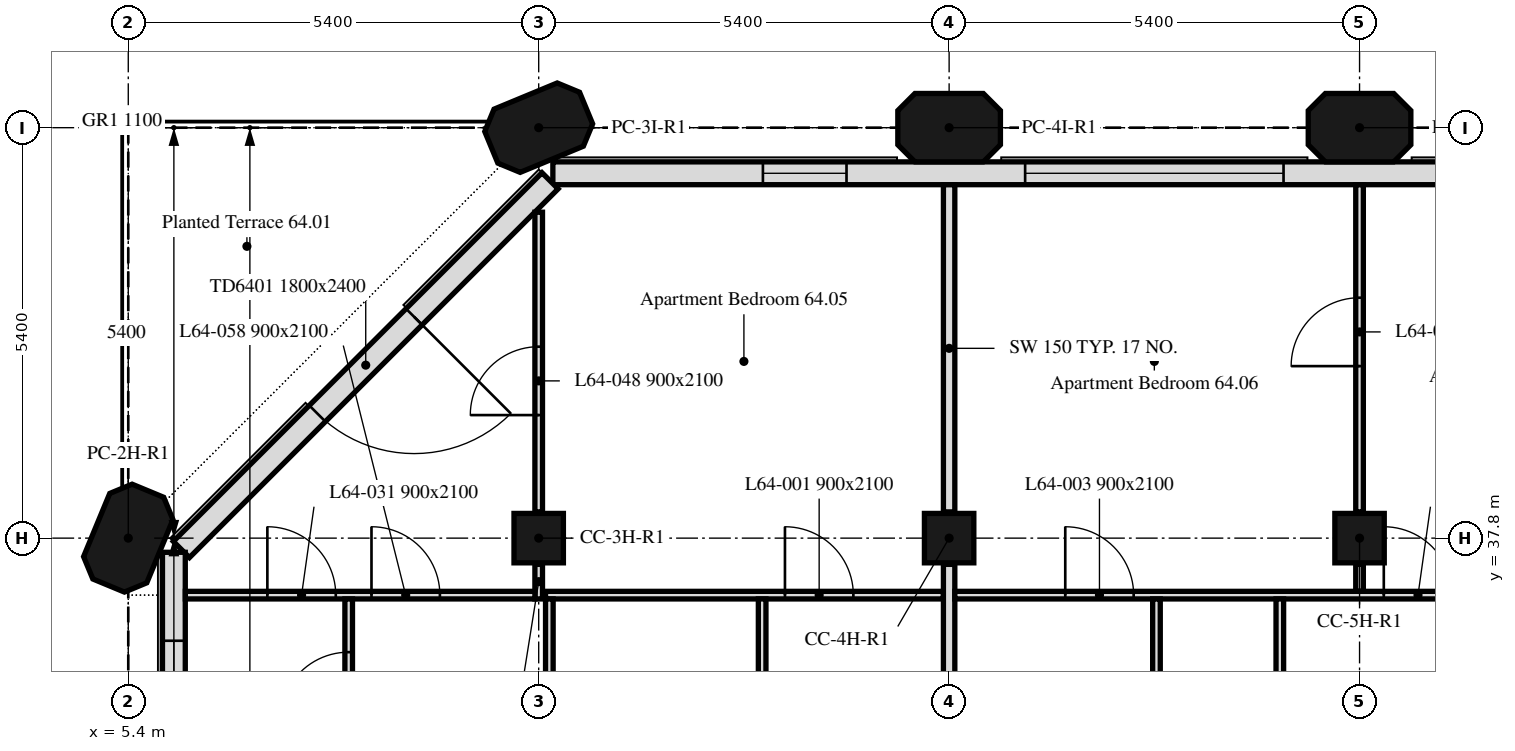
"""IFC4 building model, lengths in metres.
Left out: names, types, materials, properties, quantities, classifications, styles, units other than length and angle.
Written with IfcOpenShell. Run it as: python <this file> out.ifc"""

import sys

from ifc_helpers import new_model, si_unit, direction, frame, frame_2d, origin, origin_2d, place, context, subcontext, project, spatial, polyline, rectangle, outline, extrude, element, fill, save


model = new_model("IFC4")
c1 = context("Model", 3, precision=1e-05, world=origin(), true_north=direction((0.0, 1.0)))
c2 = subcontext(c1, "Body", "Model", "MODEL_VIEW")
j1 = project(units=[si_unit("LENGTHUNIT", "METRE"), si_unit("PLANEANGLEUNIT", "RADIAN")], contexts=[c1])
p1 = place(None, origin())
s1 = spatial("IfcSite", under=j1, at=p1, CompositionType="ELEMENT")
p2 = place(p1, origin())
s2 = spatial("IfcBuilding", under=s1, at=p2, CompositionType="ELEMENT")
p3 = place(p2, frame((0.0, 0.0, 265.3)))
s3 = spatial("IfcBuildingStorey", under=s2, at=p3, CompositionType="ELEMENT", Elevation=265.3)
p4 = place(p3, frame((5.4, 37.8, 0.0), z_axis=(0.0, 0.0, 1.0), x_axis=(0.382683432365, 0.923879532511, 0.0)))
e1 = element("IfcColumn", 1, at=p4, inside=s3, PredefinedType="COLUMN", context=c2, shape_type="SweptSolid", body=[
    extrude(outline(polyline([(-0.45, -0.45), (0.45, -0.45), (0.675, -0.225), (0.675, 0.225), (0.45, 0.45), (-0.45, 0.45), (-0.675, 0.225), (-0.675, -0.225), (-0.45, -0.45)])), origin(), (0.0, 0.0, 1.0), 3.0),
])
for number, where, z_axis, x_axis in (
    (2, (10.8, 37.8, 0.0), (0.0, 0.0, 1.0), (1.0, 0.0, 0.0)),
    (3, (16.2, 37.8, 0.0), (0.0, 0.0, 1.0), (1.0, 0.0, 0.0)),
    (4, (21.6, 37.8, 0.0), (0.0, 0.0, 1.0), (1.0, 0.0, 0.0)),
):
    element("IfcColumn", number, at=place(p3, frame(where, z_axis=z_axis, x_axis=x_axis)), inside=s3, PredefinedType="COLUMN", context=c2, shape_type="SweptSolid", body=[
        extrude(rectangle(XDim=0.65, YDim=0.65, at=origin_2d()), origin(), (0.0, 0.0, 1.0), 3.0),
    ])
for number, where, z_axis, x_axis in (
    (5, (10.8, 43.2, 0.0), (0.0, 0.0, 1.0), (0.924, 0.383, 0.0)),
    (6, (16.2, 43.2, 0.0), (0.0, 0.0, 1.0), (1.0, 0.0, 0.0)),
    (7, (21.6, 43.2, 0.0), (0.0, 0.0, 1.0), (1.0, 0.0, 0.0)),
):
    element("IfcColumn", number, at=place(p3, frame(where, z_axis=z_axis, x_axis=x_axis)), inside=s3, PredefinedType="COLUMN", context=c2, shape_type="SweptSolid", body=[
        extrude(outline(polyline([(-0.45, -0.45), (0.45, -0.45), (0.675, -0.225), (0.675, 0.225), (0.45, 0.45), (-0.45, 0.45), (-0.675, 0.225), (-0.675, -0.225), (-0.45, -0.45)])), origin(), (0.0, 0.0, 1.0), 3.0),
    ])
p5 = place(p3, frame((43.014, 42.6, 0.0), z_axis=(0.0, 0.0, 1.0), x_axis=(-1.0, 0.0, 0.0)))
e8 = element("IfcWall", 8, at=p5, inside=s3, PredefinedType="SOLIDWALL", context=c2, shape_type="SweptSolid", body=[
    extrude(rectangle(XDim=32.027, YDim=0.3, at=frame_2d((16.014, 0.0))), origin(), (0.0, 0.0, 1.0), 3.0),
])
p6 = place(p5, frame((0.814, 0.0, 0.9)))
e9 = element("IfcOpeningElement", 9, at=p6, cuts=e8, PredefinedType="OPENING", context=c2, shape_type="SweptSolid", body=[
    extrude(rectangle(XDim=3.4, YDim=1.7, at=frame_2d((1.7, 0.85))), frame((0.0, 0.16, 0.0), z_axis=(0.0, -1.0, 0.0), x_axis=(1.0, 0.0, 0.0)), (0.0, 0.0, 1.0), 0.32),
])
p7 = place(p5, frame((6.564, 0.0, 0.9)))
e10 = element("IfcOpeningElement", 10, at=p7, cuts=e8, PredefinedType="OPENING", context=c2, shape_type="SweptSolid", body=[
    extrude(rectangle(XDim=1.1, YDim=1.7, at=frame_2d((0.55, 0.85))), frame((0.0, 0.16, 0.0), z_axis=(0.0, -1.0, 0.0), x_axis=(1.0, 0.0, 0.0)), (0.0, 0.0, 1.0), 0.32),
])
p8 = place(p5, frame((11.614, 0.0, 0.9)))
e11 = element("IfcOpeningElement", 11, at=p8, cuts=e8, PredefinedType="OPENING", context=c2, shape_type="SweptSolid", body=[
    extrude(rectangle(XDim=3.4, YDim=1.7, at=frame_2d((1.7, 0.85))), frame((0.0, 0.16, 0.0), z_axis=(0.0, -1.0, 0.0), x_axis=(1.0, 0.0, 0.0)), (0.0, 0.0, 1.0), 0.32),
])
p9 = place(p5, frame((17.364, 0.0, 0.9)))
e12 = element("IfcOpeningElement", 12, at=p9, cuts=e8, PredefinedType="OPENING", context=c2, shape_type="SweptSolid", body=[
    extrude(rectangle(XDim=1.1, YDim=1.7, at=frame_2d((0.55, 0.85))), frame((0.0, 0.16, 0.0), z_axis=(0.0, -1.0, 0.0), x_axis=(1.0, 0.0, 0.0)), (0.0, 0.0, 1.0), 0.32),
])
p10 = place(p5, frame((22.414, 0.0, 0.9)))
e13 = element("IfcOpeningElement", 13, at=p10, cuts=e8, PredefinedType="OPENING", context=c2, shape_type="SweptSolid", body=[
    extrude(rectangle(XDim=3.4, YDim=1.7, at=frame_2d((1.7, 0.85))), frame((0.0, 0.16, 0.0), z_axis=(0.0, -1.0, 0.0), x_axis=(1.0, 0.0, 0.0)), (0.0, 0.0, 1.0), 0.32),
])
p11 = place(p5, frame((28.164, 0.0, 0.9)))
e14 = element("IfcOpeningElement", 14, at=p11, cuts=e8, PredefinedType="OPENING", context=c2, shape_type="SweptSolid", body=[
    extrude(rectangle(XDim=1.1, YDim=1.7, at=frame_2d((0.55, 0.85))), frame((0.0, 0.16, 0.0), z_axis=(0.0, -1.0, 0.0), x_axis=(1.0, 0.0, 0.0)), (0.0, 0.0, 1.0), 0.32),
])
p12 = place(p3, frame((10.949, 42.501, 0.0), z_axis=(0.0, 0.0, 1.0), x_axis=(-0.707106781187, -0.707106781187, 0.0)))
e15 = element("IfcWall", 15, at=p12, inside=s3, PredefinedType="SOLIDWALL", context=c2, shape_type="SweptSolid", body=[
    extrude(rectangle(XDim=6.86, YDim=0.3, at=frame_2d((3.43, 0.0))), origin(), (0.0, 0.0, 1.0), 3.0),
])
p13 = place(p12, frame((2.53, 0.0, 0.0)))
e16 = element("IfcOpeningElement", 16, at=p13, cuts=e15, PredefinedType="OPENING", context=c2, shape_type="SweptSolid", body=[
    extrude(rectangle(XDim=1.8, YDim=2.4, at=frame_2d((0.9, 1.2))), frame((0.0, 0.16, 0.0), z_axis=(0.0, -1.0, 0.0), x_axis=(1.0, 0.0, 0.0)), (0.0, 0.0, 1.0), 0.32),
])
p14 = place(p3, frame((6.0, 37.614, 0.0), z_axis=(0.0, 0.0, 1.0), x_axis=(0.0, -1.0, 0.0)))
e17 = element("IfcWall", 17, at=p14, inside=s3, PredefinedType="SOLIDWALL", context=c2, shape_type="SweptSolid", body=[
    extrude(rectangle(XDim=5.214, YDim=0.3, at=frame_2d((2.607, 0.0))), origin(), (0.0, 0.0, 1.0), 3.0),
])
p15 = place(p14, frame((1.164, 0.0, 0.9)))
e18 = element("IfcOpeningElement", 18, at=p15, cuts=e17, PredefinedType="OPENING", context=c2, shape_type="SweptSolid", body=[
    extrude(rectangle(XDim=1.1, YDim=1.7, at=frame_2d((0.55, 0.85))), frame((0.0, 0.16, 0.0), z_axis=(0.0, -1.0, 0.0), x_axis=(1.0, 0.0, 0.0)), (0.0, 0.0, 1.0), 0.32),
])
p16 = place(p14, frame((3.139, 0.0, 0.9)))
e19 = element("IfcOpeningElement", 19, at=p16, cuts=e17, PredefinedType="OPENING", context=c2, shape_type="SweptSolid", body=[
    extrude(rectangle(XDim=0.65, YDim=1.7, at=frame_2d((0.325, 0.85))), frame((0.0, 0.16, 0.0), z_axis=(0.0, -1.0, 0.0), x_axis=(1.0, 0.0, 0.0)), (0.0, 0.0, 1.0), 0.32),
])
p17 = place(p3, frame((10.8, 37.0, 0.0), z_axis=(0.0, 0.0, 1.0), x_axis=(0.0, 1.0, 0.0)))
e20 = element("IfcWall", 20, at=p17, inside=s3, PredefinedType="PARTITIONING", context=c2, shape_type="SweptSolid", body=[
    extrude(rectangle(XDim=0.455, YDim=0.1, at=frame_2d((0.228, 0.0))), origin(), (0.0, 0.0, 1.0), 3.0),
])
p18 = place(p3, frame((10.8, 38.145, 0.0), z_axis=(0.0, 0.0, 1.0), x_axis=(0.0, 1.0, 0.0)))
e21 = element("IfcWall", 21, at=p18, inside=s3, PredefinedType="PARTITIONING", context=c2, shape_type="SweptSolid", body=[
    extrude(rectangle(XDim=3.943, YDim=0.1, at=frame_2d((1.971, 0.0))), origin(), (0.0, 0.0, 1.0), 3.0),
])
p19 = place(p18, frame((1.274, 0.0, 0.0)))
e22 = element("IfcOpeningElement", 22, at=p19, cuts=e21, PredefinedType="OPENING", context=c2, shape_type="SweptSolid", body=[
    extrude(rectangle(XDim=0.9, YDim=2.1, at=frame_2d((0.45, 1.05))), frame((0.0, 0.05, 0.0), z_axis=(0.0, -1.0, 0.0), x_axis=(1.0, 0.0, 0.0)), (0.0, 0.0, 1.0), 0.1),
])
p20 = place(p3, frame((6.151, 37.05, 0.0), z_axis=(0.0, 0.0, 1.0), x_axis=(1.0, 0.0, 0.0)))
e23 = element("IfcWall", 23, at=p20, inside=s3, PredefinedType="PARTITIONING", context=c2, shape_type="SweptSolid", body=[
    extrude(rectangle(XDim=4.599, YDim=0.1, at=frame_2d((2.3, 0.0))), origin(), (0.0, 0.0, 1.0), 3.0),
])
p21 = place(p20, frame((1.079, 0.0, 0.0)))
e24 = element("IfcOpeningElement", 24, at=p21, cuts=e23, PredefinedType="OPENING", context=c2, shape_type="SweptSolid", body=[
    extrude(rectangle(XDim=0.9, YDim=2.1, at=frame_2d((0.45, 1.05))), frame((0.0, 0.05, 0.0), z_axis=(0.0, -1.0, 0.0), x_axis=(1.0, 0.0, 0.0)), (0.0, 0.0, 1.0), 0.1),
])
p22 = place(p20, frame((2.449, 0.0, 0.0)))
e25 = element("IfcOpeningElement", 25, at=p22, cuts=e23, PredefinedType="OPENING", context=c2, shape_type="SweptSolid", body=[
    extrude(rectangle(XDim=0.9, YDim=2.1, at=frame_2d((0.45, 1.05))), frame((0.0, 0.05, 0.0), z_axis=(0.0, -1.0, 0.0), x_axis=(1.0, 0.0, 0.0)), (0.0, 0.0, 1.0), 0.1),
])
p23 = place(p3, frame((16.2, 38.145, 0.0), z_axis=(0.0, 0.0, 1.0), x_axis=(0.0, 1.0, 0.0)))
e26 = element("IfcWall", 26, at=p23, inside=s3, PredefinedType="PARTITIONING", context=c2, shape_type="SweptSolid", body=[
    extrude(rectangle(XDim=4.304, YDim=0.15, at=frame_2d((2.152, 0.0))), origin(), (0.0, 0.0, 1.0), 3.0),
])
p24 = place(p3, frame((10.89, 37.05, 0.0), z_axis=(0.0, 0.0, 1.0), x_axis=(1.0, 0.0, 0.0)))
e27 = element("IfcWall", 27, at=p24, inside=s3, PredefinedType="PARTITIONING", context=c2, shape_type="SweptSolid", body=[
    extrude(rectangle(XDim=5.235, YDim=0.1, at=frame_2d((2.618, 0.0))), origin(), (0.0, 0.0, 1.0), 3.0),
])
p25 = place(p24, frame((3.15, 0.0, 0.0)))
e28 = element("IfcOpeningElement", 28, at=p25, cuts=e27, PredefinedType="OPENING", context=c2, shape_type="SweptSolid", body=[
    extrude(rectangle(XDim=0.9, YDim=2.1, at=frame_2d((0.45, 1.05))), frame((0.0, 0.05, 0.0), z_axis=(0.0, -1.0, 0.0), x_axis=(1.0, 0.0, 0.0)), (0.0, 0.0, 1.0), 0.1),
])
p26 = place(p3, frame((8.3, 34.725, 0.0), z_axis=(0.0, 0.0, 1.0), x_axis=(0.0, 1.0, 0.0)))
e29 = element("IfcWall", 29, at=p26, inside=s3, PredefinedType="PARTITIONING", context=c2, shape_type="SweptSolid", body=[
    extrude(rectangle(XDim=2.275, YDim=0.1, at=frame_2d((1.137, 0.0))), origin(), (0.0, 0.0, 1.0), 3.0),
])
p27 = place(p26, frame((0.675, 0.0, 0.0)))
e30 = element("IfcOpeningElement", 30, at=p27, cuts=e29, PredefinedType="OPENING", context=c2, shape_type="SweptSolid", body=[
    extrude(rectangle(XDim=0.9, YDim=2.1, at=frame_2d((0.45, 1.05))), frame((0.0, 0.05, 0.0), z_axis=(0.0, -1.0, 0.0), x_axis=(1.0, 0.0, 0.0)), (0.0, 0.0, 1.0), 0.1),
])
p28 = place(p3, frame((10.94, 34.725, 0.0), z_axis=(0.0, 0.0, 1.0), x_axis=(0.0, 1.0, 0.0)))
e31 = element("IfcWall", 31, at=p28, inside=s3, PredefinedType="PARTITIONING", context=c2, shape_type="SweptSolid", body=[
    extrude(rectangle(XDim=2.275, YDim=0.1, at=frame_2d((1.137, 0.0))), origin(), (0.0, 0.0, 1.0), 3.0),
])
p29 = place(p28, frame((0.25, 0.0, 0.0)))
e32 = element("IfcOpeningElement", 32, at=p29, cuts=e31, PredefinedType="OPENING", context=c2, shape_type="SweptSolid", body=[
    extrude(rectangle(XDim=0.9, YDim=2.1, at=frame_2d((0.45, 1.05))), frame((0.0, 0.05, 0.0), z_axis=(0.0, -1.0, 0.0), x_axis=(1.0, 0.0, 0.0)), (0.0, 0.0, 1.0), 0.1),
])
p30 = place(p3, frame((13.74, 34.725, 0.0), z_axis=(0.0, 0.0, 1.0), x_axis=(0.0, 1.0, 0.0)))
e33 = element("IfcWall", 33, at=p30, inside=s3, PredefinedType="PARTITIONING", context=c2, shape_type="SweptSolid", body=[
    extrude(rectangle(XDim=2.275, YDim=0.1, at=frame_2d((1.137, 0.0))), origin(), (0.0, 0.0, 1.0), 3.0),
])
p31 = place(p3, frame((16.2, 34.725, 0.0), z_axis=(0.0, 0.0, 1.0), x_axis=(0.0, 1.0, 0.0)))
e34 = element("IfcWall", 34, at=p31, inside=s3, PredefinedType="PARTITIONING", context=c2, shape_type="SweptSolid", body=[
    extrude(rectangle(XDim=2.73, YDim=0.15, at=frame_2d((1.365, 0.0))), origin(), (0.0, 0.0, 1.0), 3.0),
])
p32 = place(p3, frame((21.6, 37.1, 0.0), z_axis=(0.0, 0.0, 1.0), x_axis=(0.0, 1.0, 0.0)))
e35 = element("IfcWall", 35, at=p32, inside=s3, PredefinedType="PARTITIONING", context=c2, shape_type="SweptSolid", body=[
    extrude(rectangle(XDim=0.355, YDim=0.1, at=frame_2d((0.177, 0.0))), origin(), (0.0, 0.0, 1.0), 3.0),
])
p33 = place(p3, frame((21.6, 38.145, 0.0), z_axis=(0.0, 0.0, 1.0), x_axis=(0.0, 1.0, 0.0)))
e36 = element("IfcWall", 36, at=p33, inside=s3, PredefinedType="PARTITIONING", context=c2, shape_type="SweptSolid", body=[
    extrude(rectangle(XDim=4.304, YDim=0.1, at=frame_2d((2.152, 0.0))), origin(), (0.0, 0.0, 1.0), 3.0),
])
p34 = place(p33, frame((1.918, 0.0, 0.0)))
e37 = element("IfcOpeningElement", 37, at=p34, cuts=e36, PredefinedType="OPENING", context=c2, shape_type="SweptSolid", body=[
    extrude(rectangle(XDim=0.9, YDim=2.1, at=frame_2d((0.45, 1.05))), frame((0.0, 0.05, 0.0), z_axis=(0.0, -1.0, 0.0), x_axis=(1.0, 0.0, 0.0)), (0.0, 0.0, 1.0), 0.1),
])
p35 = place(p3, frame((16.275, 37.05, 0.0), z_axis=(0.0, 0.0, 1.0), x_axis=(1.0, 0.0, 0.0)))
e38 = element("IfcWall", 38, at=p35, inside=s3, PredefinedType="PARTITIONING", context=c2, shape_type="SweptSolid", body=[
    extrude(rectangle(XDim=16.05, YDim=0.1, at=frame_2d((8.025, 0.0))), origin(), (0.0, 0.0, 1.0), 3.0),
])
p36 = place(p35, frame((1.453, 0.0, 0.0)))
e39 = element("IfcOpeningElement", 39, at=p36, cuts=e38, PredefinedType="OPENING", context=c2, shape_type="SweptSolid", body=[
    extrude(rectangle(XDim=0.9, YDim=2.1, at=frame_2d((0.45, 1.05))), frame((0.0, 0.05, 0.0), z_axis=(0.0, -1.0, 0.0), x_axis=(1.0, 0.0, 0.0)), (0.0, 0.0, 1.0), 0.1),
])
p37 = place(p35, frame((12.125, 0.0, 0.0)))
e40 = element("IfcOpeningElement", 40, at=p37, cuts=e38, PredefinedType="OPENING", context=c2, shape_type="SweptSolid", body=[
    extrude(rectangle(XDim=0.9, YDim=2.1, at=frame_2d((0.45, 1.05))), frame((0.0, 0.05, 0.0), z_axis=(0.0, -1.0, 0.0), x_axis=(1.0, 0.0, 0.0)), (0.0, 0.0, 1.0), 0.1),
])
p38 = place(p35, frame((13.625, 0.0, 0.0)))
e41 = element("IfcOpeningElement", 41, at=p38, cuts=e38, PredefinedType="OPENING", context=c2, shape_type="SweptSolid", body=[
    extrude(rectangle(XDim=0.9, YDim=2.1, at=frame_2d((0.45, 1.05))), frame((0.0, 0.05, 0.0), z_axis=(0.0, -1.0, 0.0), x_axis=(1.0, 0.0, 0.0)), (0.0, 0.0, 1.0), 0.1),
])
p39 = place(p35, frame((5.644, 0.0, 0.0)))
e42 = element("IfcOpeningElement", 42, at=p39, cuts=e38, PredefinedType="OPENING", context=c2, shape_type="SweptSolid", body=[
    extrude(rectangle(XDim=0.9, YDim=2.1, at=frame_2d((0.45, 1.05))), frame((0.0, 0.05, 0.0), z_axis=(0.0, -1.0, 0.0), x_axis=(1.0, 0.0, 0.0)), (0.0, 0.0, 1.0), 0.1),
])
p40 = place(p3, frame((18.928, 34.725, 0.0), z_axis=(0.0, 0.0, 1.0), x_axis=(0.0, 1.0, 0.0)))
e43 = element("IfcWall", 43, at=p40, inside=s3, PredefinedType="PARTITIONING", context=c2, shape_type="SweptSolid", body=[
    extrude(rectangle(XDim=2.275, YDim=0.1, at=frame_2d((1.137, 0.0))), origin(), (0.0, 0.0, 1.0), 3.0),
])
p41 = place(p3, frame((20.551, 34.725, 0.0), z_axis=(0.0, 0.0, 1.0), x_axis=(0.0, 1.0, 0.0)))
e44 = element("IfcWall", 44, at=p41, inside=s3, PredefinedType="PARTITIONING", context=c2, shape_type="SweptSolid", body=[
    extrude(rectangle(XDim=2.275, YDim=0.1, at=frame_2d((1.137, 0.0))), origin(), (0.0, 0.0, 1.0), 3.0),
])
p42 = place(p41, frame((0.25, 0.0, 0.0)))
e45 = element("IfcOpeningElement", 45, at=p42, cuts=e44, PredefinedType="OPENING", context=c2, shape_type="SweptSolid", body=[
    extrude(rectangle(XDim=0.9, YDim=2.1, at=frame_2d((0.45, 1.05))), frame((0.0, 0.05, 0.0), z_axis=(0.0, -1.0, 0.0), x_axis=(1.0, 0.0, 0.0)), (0.0, 0.0, 1.0), 0.1),
])
p43 = place(p13, origin())
e46 = element("IfcDoor", 46, at=p43, inside=s3, OperationType="DOUBLE_DOOR_DOUBLE_SWING", PredefinedType="DOOR", context=c2, shape_type="SweptSolid", body=[
    extrude(rectangle(XDim=1.8, YDim=2.4, at=frame_2d((0.9, 1.2))), frame((0.0, 0.025, 0.0), z_axis=(0.0, -1.0, 0.0), x_axis=(1.0, 0.0, 0.0)), (0.0, 0.0, 1.0), 0.05),
])
fill(e16, e46)
p44 = place(p10, origin())
e47 = element("IfcWindow", 47, at=p44, inside=s3, PartitioningType="SINGLE_PANEL", PredefinedType="WINDOW", context=c2, shape_type="SweptSolid", body=[
    extrude(rectangle(XDim=3.4, YDim=1.7, at=frame_2d((1.7, 0.85))), frame((0.0, 0.03, 0.0), z_axis=(0.0, -1.0, 0.0), x_axis=(1.0, 0.0, 0.0)), (0.0, 0.0, 1.0), 0.06),
])
fill(e13, e47)
p45 = place(p11, origin())
e48 = element("IfcWindow", 48, at=p45, inside=s3, PartitioningType="SINGLE_PANEL", PredefinedType="WINDOW", context=c2, shape_type="SweptSolid", body=[
    extrude(rectangle(XDim=1.1, YDim=1.7, at=frame_2d((0.55, 0.85))), frame((0.0, 0.03, 0.0), z_axis=(0.0, -1.0, 0.0), x_axis=(1.0, 0.0, 0.0)), (0.0, 0.0, 1.0), 0.06),
])
fill(e14, e48)
p46 = place(p15, origin())
e49 = element("IfcWindow", 49, at=p46, inside=s3, PartitioningType="SINGLE_PANEL", PredefinedType="WINDOW", context=c2, shape_type="SweptSolid", body=[
    extrude(rectangle(XDim=1.1, YDim=1.7, at=frame_2d((0.55, 0.85))), frame((0.0, 0.03, 0.0), z_axis=(0.0, -1.0, 0.0), x_axis=(1.0, 0.0, 0.0)), (0.0, 0.0, 1.0), 0.06),
])
fill(e18, e49)
p47 = place(p25, origin())
e50 = element("IfcDoor", 50, at=p47, inside=s3, OperationType="SINGLE_SWING_LEFT", PredefinedType="DOOR", context=c2, shape_type="SweptSolid", body=[
    extrude(rectangle(XDim=0.9, YDim=2.1, at=frame_2d((0.45, 1.05))), frame((0.0, 0.025, 0.0), z_axis=(0.0, -1.0, 0.0), x_axis=(1.0, 0.0, 0.0)), (0.0, 0.0, 1.0), 0.05),
])
fill(e28, e50)
p48 = place(p36, origin())
e51 = element("IfcDoor", 51, at=p48, inside=s3, OperationType="SINGLE_SWING_RIGHT", PredefinedType="DOOR", context=c2, shape_type="SweptSolid", body=[
    extrude(rectangle(XDim=0.9, YDim=2.1, at=frame_2d((0.45, 1.05))), frame((0.0, 0.025, 0.0), z_axis=(0.0, -1.0, 0.0), x_axis=(1.0, 0.0, 0.0)), (0.0, 0.0, 1.0), 0.05),
])
fill(e39, e51)
p49 = place(p21, origin())
e52 = element("IfcDoor", 52, at=p49, inside=s3, OperationType="SINGLE_SWING_RIGHT", PredefinedType="DOOR", context=c2, shape_type="SweptSolid", body=[
    extrude(rectangle(XDim=0.9, YDim=2.1, at=frame_2d((0.45, 1.05))), frame((0.0, 0.025, 0.0), z_axis=(0.0, -1.0, 0.0), x_axis=(1.0, 0.0, 0.0)), (0.0, 0.0, 1.0), 0.05),
])
fill(e24, e52)
p50 = place(p27, origin())
e53 = element("IfcDoor", 53, at=p50, inside=s3, OperationType="SINGLE_SWING_LEFT", PredefinedType="DOOR", context=c2, shape_type="SweptSolid", body=[
    extrude(rectangle(XDim=0.9, YDim=2.1, at=frame_2d((0.45, 1.05))), frame((0.0, 0.025, 0.0), z_axis=(0.0, -1.0, 0.0), x_axis=(1.0, 0.0, 0.0)), (0.0, 0.0, 1.0), 0.05),
])
fill(e30, e53)
p51 = place(p34, origin())
e54 = element("IfcDoor", 54, at=p51, inside=s3, OperationType="SINGLE_SWING_LEFT", PredefinedType="DOOR", context=c2, shape_type="SweptSolid", body=[
    extrude(rectangle(XDim=0.9, YDim=2.1, at=frame_2d((0.45, 1.05))), frame((0.0, 0.025, 0.0), z_axis=(0.0, -1.0, 0.0), x_axis=(1.0, 0.0, 0.0)), (0.0, 0.0, 1.0), 0.05),
])
fill(e37, e54)
p52 = place(p19, origin())
e55 = element("IfcDoor", 55, at=p52, inside=s3, OperationType="SINGLE_SWING_LEFT", PredefinedType="DOOR", context=c2, shape_type="SweptSolid", body=[
    extrude(rectangle(XDim=0.9, YDim=2.1, at=frame_2d((0.45, 1.05))), frame((0.0, 0.025, 0.0), z_axis=(0.0, -1.0, 0.0), x_axis=(1.0, 0.0, 0.0)), (0.0, 0.0, 1.0), 0.05),
])
fill(e22, e55)
p53 = place(p39, origin())
e56 = element("IfcDoor", 56, at=p53, inside=s3, OperationType="SINGLE_SWING_RIGHT", PredefinedType="DOOR", context=c2, shape_type="SweptSolid", body=[
    extrude(rectangle(XDim=0.9, YDim=2.1, at=frame_2d((0.45, 1.05))), frame((0.0, 0.025, 0.0), z_axis=(0.0, -1.0, 0.0), x_axis=(1.0, 0.0, 0.0)), (0.0, 0.0, 1.0), 0.05),
])
fill(e42, e56)
p54 = place(p22, origin())
e57 = element("IfcDoor", 57, at=p54, inside=s3, OperationType="SINGLE_SWING_LEFT", PredefinedType="DOOR", context=c2, shape_type="SweptSolid", body=[
    extrude(rectangle(XDim=0.9, YDim=2.1, at=frame_2d((0.45, 1.05))), frame((0.0, 0.025, 0.0), z_axis=(0.0, -1.0, 0.0), x_axis=(1.0, 0.0, 0.0)), (0.0, 0.0, 1.0), 0.05),
])
fill(e25, e57)
save(model, sys.argv[1])
